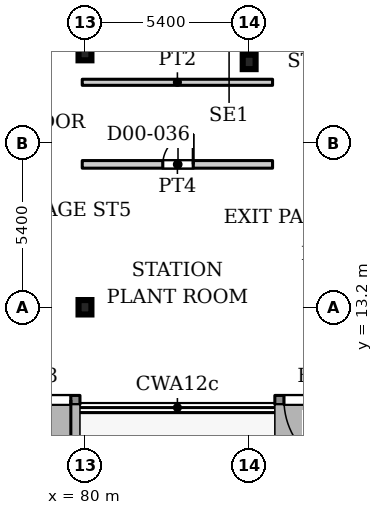
"""IFC4 building model, lengths in metres.
Left out: names, types, materials, properties, quantities, classifications, styles, units other than length and angle.
Written with IfcOpenShell. Run it as: python <this file> out.ifc"""

import sys

from ifc_helpers import new_model, si_unit, direction, frame, frame_2d, origin, origin_2d, place, context, subcontext, project, spatial, rectangle, i_section, extrude, source, transform, mapped, element, fill, save


model = new_model("IFC4")
c1 = context("Model", 3, precision=1e-05, world=origin(), true_north=direction((0.0, 1.0)))
c2 = subcontext(c1, "Body", "Model", "MODEL_VIEW")
j1 = project(units=[si_unit("LENGTHUNIT", "METRE"), si_unit("PLANEANGLEUNIT", "RADIAN")], contexts=[c1])
p1 = place(None, origin())
s1 = spatial("IfcSite", under=j1, at=p1, CompositionType="ELEMENT")
p2 = place(p1, origin())
s2 = spatial("IfcBuilding", under=s1, at=p2, CompositionType="ELEMENT")
p3 = place(p2, origin())
s3 = spatial("IfcBuildingStorey", under=s2, at=p3, CompositionType="ELEMENT", Elevation=0.0)
for number, where, z_axis, x_axis in (
    (1, (80.0, 13.2, 0.0), (0.0, 0.0, 1.0), (1.0, 0.0, 0.0)),
    (2, (85.4, 21.27, 0.0), (0.0, 0.0, 1.0), (1.0, 0.0, 0.0)),
    (3, (80.0, 21.56, 0.0), (0.0, 0.0, 1.0), (1.0, 0.0, 0.0)),
):
    element("IfcColumn", number, at=place(p3, frame(where, z_axis=z_axis, x_axis=x_axis)), inside=s3, PredefinedType="COLUMN", context=c2, shape_type="SweptSolid", body=[
        extrude(i_section(OverallWidth=0.424, OverallDepth=0.474, WebThickness=0.048, FlangeThickness=0.077, FilletRadius=0.014, at=origin_2d()), origin(), (0.0, 0.0, 1.0), 7.5),
    ])
p4 = place(p3, frame((89.245, 10.15, 0.0), z_axis=(0.0, 0.0, 1.0), x_axis=(-1.0, 0.0, 0.0)))
e4 = element("IfcWall", 4, at=p4, inside=s3, PredefinedType="SOLIDWALL", context=c2, shape_type="SweptSolid", body=[
    extrude(rectangle(XDim=3.0, YDim=0.3, at=frame_2d((1.5, 0.0))), origin(), (0.0, 0.0, 1.0), 7.25),
])
p5 = place(p4, frame((0.3, 0.0, 0.0)))
e5 = element("IfcOpeningElement", 5, at=p5, cuts=e4, PredefinedType="OPENING", context=c2, shape_type="SweptSolid", body=[
    extrude(rectangle(XDim=2.4, YDim=2.7, at=frame_2d((1.2, 1.35))), frame((0.0, 0.16, 0.0), z_axis=(0.0, -1.0, 0.0), x_axis=(1.0, 0.0, 0.0)), (0.0, 0.0, 1.0), 0.32),
])
p6 = place(p3, frame((79.835, 10.15, 0.0), z_axis=(0.0, 0.0, 1.0), x_axis=(-1.0, 0.0, 0.0)))
e6 = element("IfcWall", 6, at=p6, inside=s3, PredefinedType="SOLIDWALL", context=c2, shape_type="SweptSolid", body=[
    extrude(rectangle(XDim=3.0, YDim=0.3, at=frame_2d((1.5, 0.0))), origin(), (0.0, 0.0, 1.0), 7.25),
])
p7 = place(p6, frame((0.3, 0.0, 0.0)))
e7 = element("IfcOpeningElement", 7, at=p7, cuts=e6, PredefinedType="OPENING", context=c2, shape_type="SweptSolid", body=[
    extrude(rectangle(XDim=2.4, YDim=2.7, at=frame_2d((1.2, 1.35))), frame((0.0, 0.16, 0.0), z_axis=(0.0, -1.0, 0.0), x_axis=(1.0, 0.0, 0.0)), (0.0, 0.0, 1.0), 0.32),
])
p8 = place(p3, frame((79.91, 17.9, 0.0), z_axis=(0.0, 0.0, 1.0), x_axis=(1.0, 0.0, 0.0)))
e8 = element("IfcWall", 8, at=p8, inside=s3, PredefinedType="PARTITIONING", context=c2, shape_type="SweptSolid", body=[
    extrude(rectangle(XDim=6.26, YDim=0.25, at=frame_2d((3.13, 0.0))), origin(), (0.0, 0.0, 1.0), 7.08),
])
p9 = place(p8, frame((2.65, 0.0, 0.0)))
e9 = element("IfcOpeningElement", 9, at=p9, cuts=e8, PredefinedType="OPENING", context=c2, shape_type="SweptSolid", body=[
    extrude(rectangle(XDim=1.0, YDim=2.1, at=frame_2d((0.5, 1.05))), frame((0.0, 0.135, 0.0), z_axis=(0.0, -1.0, 0.0), x_axis=(1.0, 0.0, 0.0)), (0.0, 0.0, 1.0), 0.27),
])
p10 = place(p3, frame((79.91, 20.6, 0.0), z_axis=(0.0, 0.0, 1.0), x_axis=(1.0, 0.0, 0.0)))
e10 = element("IfcWall", 10, at=p10, inside=s3, PredefinedType="PARTITIONING", context=c2, shape_type="SweptSolid", body=[
    extrude(rectangle(XDim=6.26, YDim=0.2, at=frame_2d((3.13, 0.0))), origin(), (0.0, 0.0, 1.0), 7.08),
])
m1 = source(origin(), c2, "Body", "SweptSolid", [
    extrude(rectangle(XDim=2.4, YDim=2.7, at=frame_2d((1.2, 1.35))), frame((0.0, 0.025, 0.0), z_axis=(0.0, -1.0, 0.0), x_axis=(1.0, 0.0, 0.0)), (0.0, 0.0, 1.0), 0.05),
])
p11 = place(p5, origin())
e11 = element("IfcDoor", 11, at=p11, inside=s3, OperationType="DOUBLE_DOOR_SINGLE_SWING", PredefinedType="DOOR", context=c2, shape_type="MappedRepresentation", body=[
    mapped(m1, transform((0.0, 0.0, 0.0), x_axis=(1.0, 0.0, 0.0), y_axis=(0.0, 1.0, 0.0), z_axis=(0.0, 0.0, 1.0), scale=1.0)),
])
fill(e5, e11)
p12 = place(p7, origin())
e12 = element("IfcDoor", 12, at=p12, inside=s3, OperationType="DOUBLE_DOOR_SINGLE_SWING", PredefinedType="DOOR", context=c2, shape_type="MappedRepresentation", body=[
    mapped(m1, transform((0.0, 0.0, 0.0), x_axis=(1.0, 0.0, 0.0), y_axis=(0.0, 1.0, 0.0), z_axis=(0.0, 0.0, 1.0), scale=1.0)),
])
fill(e7, e12)
m2 = source(origin(), c2, "Body", "SweptSolid", [
    extrude(rectangle(XDim=1.0, YDim=2.1, at=frame_2d((0.5, 1.05))), frame((0.0, 0.025, 0.0), z_axis=(0.0, -1.0, 0.0), x_axis=(1.0, 0.0, 0.0)), (0.0, 0.0, 1.0), 0.05),
])
p13 = place(p9, origin())
e13 = element("IfcDoor", 13, at=p13, inside=s3, OperationType="SINGLE_SWING_LEFT", PredefinedType="DOOR", context=c2, shape_type="MappedRepresentation", body=[
    mapped(m2, transform((0.0, 0.0, 0.0), x_axis=(1.0, 0.0, 0.0), y_axis=(0.0, 1.0, 0.0), z_axis=(0.0, 0.0, 1.0), scale=1.0)),
])
fill(e9, e13)
save(model, sys.argv[1])
